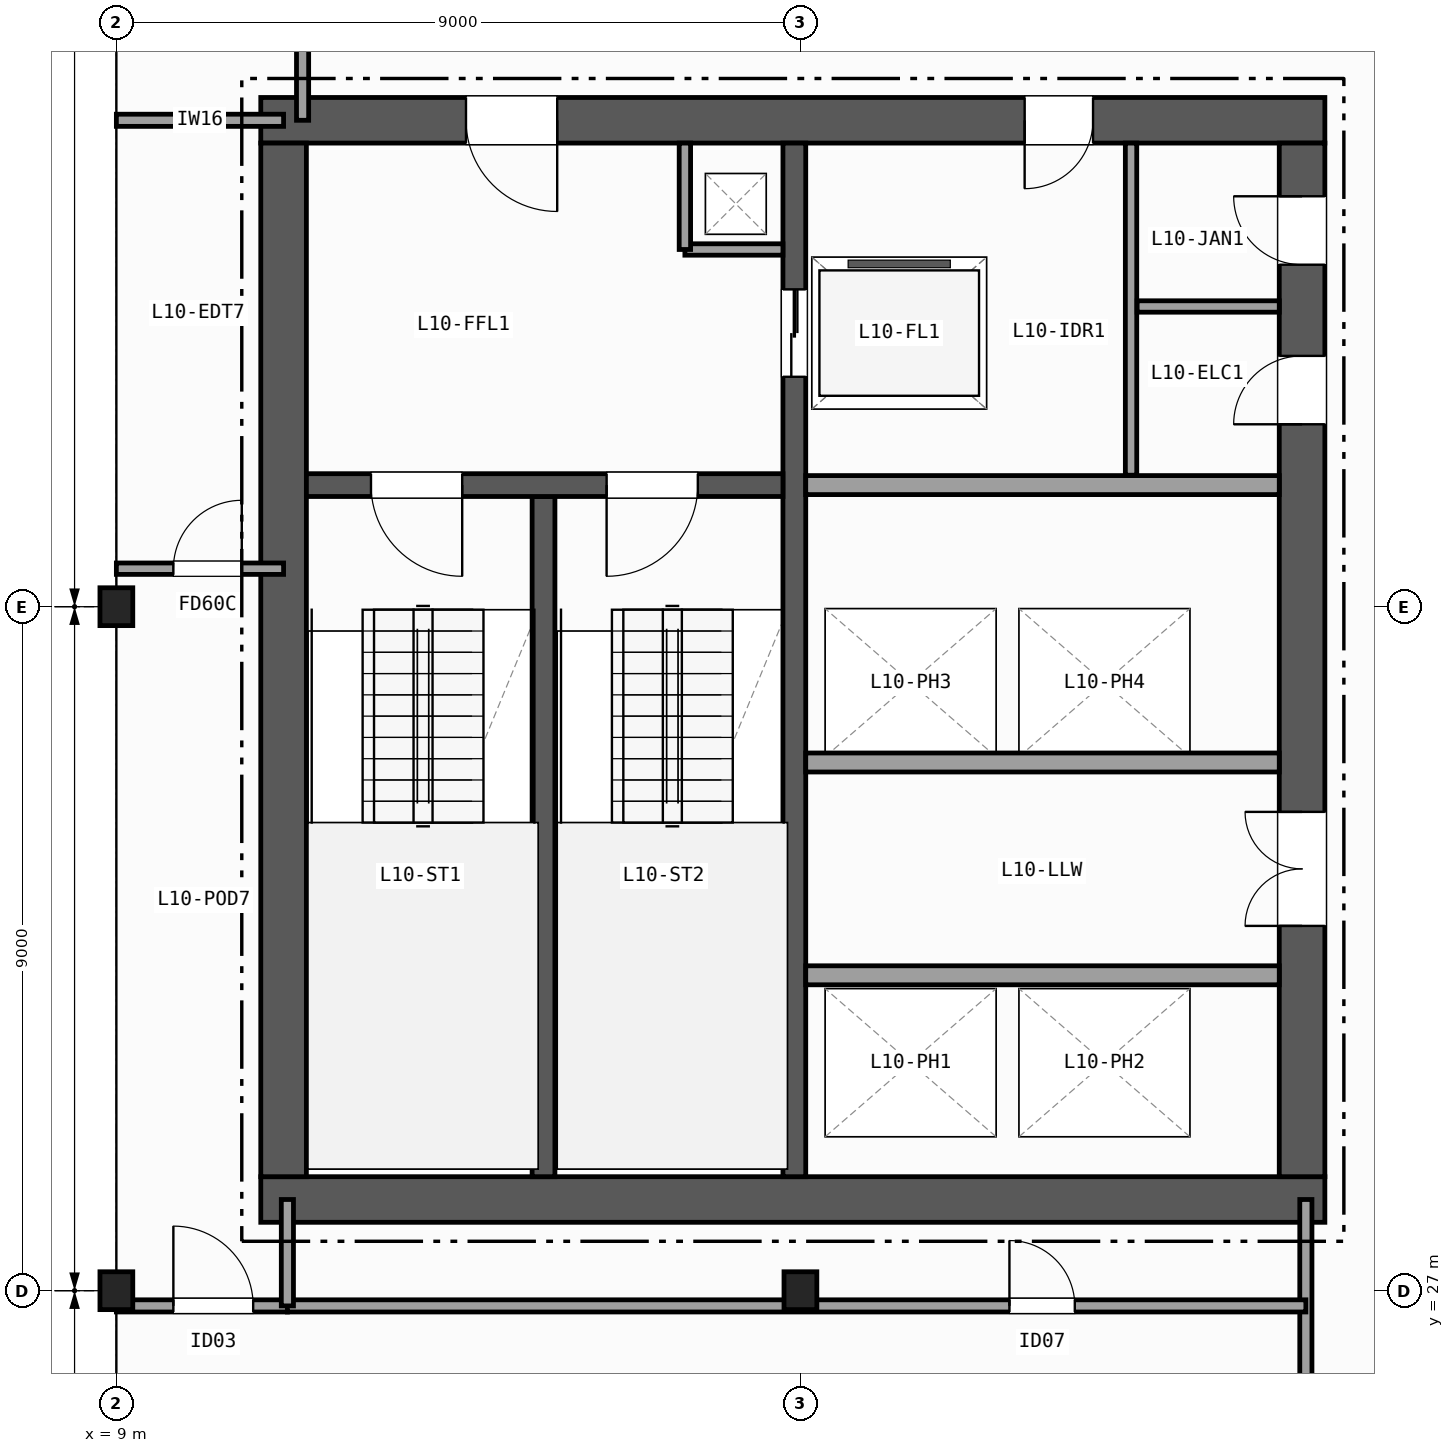
"""IFC4 building model, lengths in metres.
Left out: names, types, materials, properties, quantities, classifications, styles, units other than length and angle.
Written with IfcOpenShell. Run it as: python <this file> out.ifc"""

import sys

from ifc_helpers import new_model, si_unit, direction, frame, frame_2d, origin, origin_2d, place, context, subcontext, project, spatial, rectangle, i_section, extrude, element, fill, save


model = new_model("IFC4")
c1 = context("Model", 3, precision=1e-05, world=origin(), true_north=direction((0.0, 1.0)))
c2 = subcontext(c1, "Body", "Model", "MODEL_VIEW")
j1 = project(units=[si_unit("LENGTHUNIT", "METRE"), si_unit("PLANEANGLEUNIT", "RADIAN")], contexts=[c1])
p1 = place(None, origin())
s1 = spatial("IfcSite", under=j1, at=p1, CompositionType="ELEMENT")
p2 = place(p1, origin())
s2 = spatial("IfcBuilding", under=s1, at=p2, CompositionType="ELEMENT")
p3 = place(p2, frame((0.0, 0.0, 47.1)))
s3 = spatial("IfcBuildingStorey", under=s2, at=p3, CompositionType="ELEMENT", Elevation=47.1)
for number, where, z_axis, x_axis in (
    (1, (9.0, 27.0, 0.0), (0.0, 0.0, 1.0), (1.0, 0.0, 0.0)),
    (2, (9.0, 36.0, 0.0), (0.0, 0.0, 1.0), (1.0, 0.0, 0.0)),
    (3, (18.0, 27.0, 0.0), (0.0, 0.0, 1.0), (1.0, 0.0, 0.0)),
):
    element("IfcColumn", number, at=place(p3, frame(where, z_axis=z_axis, x_axis=x_axis)), inside=s3, PredefinedType="COLUMN", context=c2, shape_type="SweptSolid", body=[
        extrude(i_section(OverallWidth=0.432, OverallDepth=0.498, WebThickness=0.056, FlangeThickness=0.089, FilletRadius=0.015, at=origin_2d()), origin(), (0.0, 0.0, 1.0), 3.7),
    ])
p4 = place(p3, frame((10.9, 28.2, 0.0), z_axis=(0.0, 0.0, 1.0), x_axis=(1.0, 0.0, 0.0)))
e4 = element("IfcWall", 4, at=p4, inside=s3, PredefinedType="SHEAR", context=c2, shape_type="SweptSolid", body=[
    extrude(rectangle(XDim=14.0, YDim=0.6, at=frame_2d((7.0, 0.0))), origin(), (0.0, 0.0, 1.0), 3.42),
])
p5 = place(p3, frame((24.9, 42.4, 0.0), z_axis=(0.0, 0.0, 1.0), x_axis=(-1.0, 0.0, 0.0)))
e5 = element("IfcWall", 5, at=p5, inside=s3, PredefinedType="SHEAR", context=c2, shape_type="SweptSolid", body=[
    extrude(rectangle(XDim=14.0, YDim=0.6, at=frame_2d((7.0, 0.0))), origin(), (0.0, 0.0, 1.0), 3.42),
])
p6 = place(p5, frame((10.1, 0.0, 0.0)))
e6 = element("IfcOpeningElement", 6, at=p6, cuts=e5, PredefinedType="OPENING", context=c2, shape_type="SweptSolid", body=[
    extrude(rectangle(XDim=1.2, YDim=2.15, at=frame_2d((0.6, 1.075))), frame((0.0, 0.31, 0.0), z_axis=(0.0, -1.0, 0.0), x_axis=(1.0, 0.0, 0.0)), (0.0, 0.0, 1.0), 0.62),
])
p7 = place(p5, frame((3.05, 0.0, 0.0)))
e7 = element("IfcOpeningElement", 7, at=p7, cuts=e5, PredefinedType="OPENING", context=c2, shape_type="SweptSolid", body=[
    extrude(rectangle(XDim=0.9, YDim=2.1, at=frame_2d((0.45, 1.05))), frame((0.0, 0.31, 0.0), z_axis=(0.0, -1.0, 0.0), x_axis=(1.0, 0.0, 0.0)), (0.0, 0.0, 1.0), 0.62),
])
p8 = place(p3, frame((11.2, 42.1, 0.0), z_axis=(0.0, 0.0, 1.0), x_axis=(0.0, -1.0, 0.0)))
e8 = element("IfcWall", 8, at=p8, inside=s3, PredefinedType="SHEAR", context=c2, shape_type="SweptSolid", body=[
    extrude(rectangle(XDim=13.6, YDim=0.6, at=frame_2d((6.8, 0.0))), origin(), (0.0, 0.0, 1.0), 3.42),
])
p9 = place(p3, frame((24.6, 28.5, 0.0), z_axis=(0.0, 0.0, 1.0), x_axis=(0.0, 1.0, 0.0)))
e9 = element("IfcWall", 9, at=p9, inside=s3, PredefinedType="SHEAR", context=c2, shape_type="SweptSolid", body=[
    extrude(rectangle(XDim=13.6, YDim=0.6, at=frame_2d((6.8, 0.0))), origin(), (0.0, 0.0, 1.0), 3.42),
])
p10 = place(p9, frame((3.3, 0.0, 0.0)))
e10 = element("IfcOpeningElement", 10, at=p10, cuts=e9, PredefinedType="OPENING", context=c2, shape_type="SweptSolid", body=[
    extrude(rectangle(XDim=1.5, YDim=2.2, at=frame_2d((0.75, 1.1))), frame((0.0, 0.31, 0.0), z_axis=(0.0, -1.0, 0.0), x_axis=(1.0, 0.0, 0.0)), (0.0, 0.0, 1.0), 0.62),
])
p11 = place(p9, frame((9.9, 0.0, 0.0)))
e11 = element("IfcOpeningElement", 11, at=p11, cuts=e9, PredefinedType="OPENING", context=c2, shape_type="SweptSolid", body=[
    extrude(rectangle(XDim=0.9, YDim=2.1, at=frame_2d((0.45, 1.05))), frame((0.0, 0.31, 0.0), z_axis=(0.0, -1.0, 0.0), x_axis=(1.0, 0.0, 0.0)), (0.0, 0.0, 1.0), 0.62),
])
p12 = place(p9, frame((12.0, 0.0, 0.0)))
e12 = element("IfcOpeningElement", 12, at=p12, cuts=e9, PredefinedType="OPENING", context=c2, shape_type="SweptSolid", body=[
    extrude(rectangle(XDim=0.9, YDim=2.1, at=frame_2d((0.45, 1.05))), frame((0.0, 0.31, 0.0), z_axis=(0.0, -1.0, 0.0), x_axis=(1.0, 0.0, 0.0)), (0.0, 0.0, 1.0), 0.62),
])
p13 = place(p3, frame((14.62, 28.5, 0.0), z_axis=(0.0, 0.0, 1.0), x_axis=(0.0, 1.0, 0.0)))
e13 = element("IfcWall", 13, at=p13, inside=s3, PredefinedType="SHEAR", context=c2, shape_type="SweptSolid", body=[
    extrude(rectangle(XDim=8.95, YDim=0.3, at=frame_2d((4.475, 0.0))), origin(), (0.0, 0.0, 1.0), 3.42),
])
p14 = place(p3, frame((17.92, 42.1, 0.0), z_axis=(0.0, 0.0, 1.0), x_axis=(0.0, -1.0, 0.0)))
e14 = element("IfcWall", 14, at=p14, inside=s3, PredefinedType="SHEAR", context=c2, shape_type="SweptSolid", body=[
    extrude(rectangle(XDim=13.6, YDim=0.3, at=frame_2d((6.8, 0.0))), origin(), (0.0, 0.0, 1.0), 3.42),
])
p15 = place(p14, frame((1.925, 0.0, 0.0)))
e15 = element("IfcOpeningElement", 15, at=p15, cuts=e14, PredefinedType="OPENING", context=c2, shape_type="SweptSolid", body=[
    extrude(rectangle(XDim=1.15, YDim=2.15, at=frame_2d((0.575, 1.075))), frame((0.0, 0.16, 0.0), z_axis=(0.0, -1.0, 0.0), x_axis=(1.0, 0.0, 0.0)), (0.0, 0.0, 1.0), 0.32),
])
p16 = place(p3, frame((17.77, 37.6, 0.0), z_axis=(0.0, 0.0, 1.0), x_axis=(-1.0, 0.0, 0.0)))
e16 = element("IfcWall", 16, at=p16, inside=s3, PredefinedType="SHEAR", context=c2, shape_type="SweptSolid", body=[
    extrude(rectangle(XDim=6.27, YDim=0.3, at=frame_2d((3.135, 0.0))), origin(), (0.0, 0.0, 1.0), 3.42),
])
p17 = place(p16, frame((4.22, 0.0, 0.0)))
e17 = element("IfcOpeningElement", 17, at=p17, cuts=e16, PredefinedType="OPENING", context=c2, shape_type="SweptSolid", body=[
    extrude(rectangle(XDim=1.2, YDim=2.15, at=frame_2d((0.6, 1.075))), frame((0.0, 0.16, 0.0), z_axis=(0.0, -1.0, 0.0), x_axis=(1.0, 0.0, 0.0)), (0.0, 0.0, 1.0), 0.32),
])
p18 = place(p16, frame((1.12, 0.0, 0.0)))
e18 = element("IfcOpeningElement", 18, at=p18, cuts=e16, PredefinedType="OPENING", context=c2, shape_type="SweptSolid", body=[
    extrude(rectangle(XDim=1.2, YDim=2.15, at=frame_2d((0.6, 1.075))), frame((0.0, 0.16, 0.0), z_axis=(0.0, -1.0, 0.0), x_axis=(1.0, 0.0, 0.0)), (0.0, 0.0, 1.0), 0.32),
])
p19 = place(p3, frame((16.48, 40.7, 0.0), z_axis=(0.0, 0.0, 1.0), x_axis=(1.0, 0.0, 0.0)))
e19 = element("IfcWall", 19, at=p19, inside=s3, PredefinedType="PARTITIONING", context=c2, shape_type="SweptSolid", body=[
    extrude(rectangle(XDim=1.29, YDim=0.15, at=frame_2d((0.645, 0.0))), origin(), (0.0, 0.0, 1.0), 3.42),
])
p20 = place(p3, frame((16.48, 40.7, 0.0), z_axis=(0.0, 0.0, 1.0), x_axis=(0.0, 1.0, 0.0)))
e20 = element("IfcWall", 20, at=p20, inside=s3, PredefinedType="PARTITIONING", context=c2, shape_type="SweptSolid", body=[
    extrude(rectangle(XDim=1.4, YDim=0.15, at=frame_2d((0.7, 0.0))), origin(), (0.0, 0.0, 1.0), 3.42),
])
for number, where, z_axis, x_axis in (
    (21, (18.07, 37.6, 0.0), (0.0, 0.0, 1.0), (1.0, 0.0, 0.0)),
    (22, (18.07, 31.15, 0.0), (0.0, 0.0, 1.0), (1.0, 0.0, 0.0)),
    (23, (24.3, 33.95, 0.0), (0.0, 0.0, 1.0), (-1.0, 0.0, 0.0)),
):
    element("IfcWall", number, at=place(p3, frame(where, z_axis=z_axis, x_axis=x_axis)), inside=s3, PredefinedType="PARTITIONING", context=c2, shape_type="SweptSolid", body=[
        extrude(rectangle(XDim=6.23, YDim=0.25, at=frame_2d((3.115, 0.0))), origin(), (0.0, 0.0, 1.0), 3.42),
    ])
p21 = place(p3, frame((22.35, 37.73, 0.0), z_axis=(0.0, 0.0, 1.0), x_axis=(0.0, 1.0, 0.0)))
e24 = element("IfcWall", 24, at=p21, inside=s3, PredefinedType="PARTITIONING", context=c2, shape_type="SweptSolid", body=[
    extrude(rectangle(XDim=4.37, YDim=0.15, at=frame_2d((2.185, 0.0))), origin(), (0.0, 0.0, 1.0), 3.42),
])
p22 = place(p3, frame((22.43, 39.95, 0.0), z_axis=(0.0, 0.0, 1.0), x_axis=(1.0, 0.0, 0.0)))
e25 = element("IfcWall", 25, at=p22, inside=s3, PredefinedType="PARTITIONING", context=c2, shape_type="SweptSolid", body=[
    extrude(rectangle(XDim=1.87, YDim=0.15, at=frame_2d((0.935, 0.0))), origin(), (0.0, 0.0, 1.0), 3.42),
])
p23 = place(p3, frame((9.0, 26.8, 0.0), z_axis=(0.0, 0.0, 1.0), x_axis=(1.0, 0.0, 0.0)))
e26 = element("IfcWall", 26, at=p23, inside=s3, PredefinedType="PARTITIONING", context=c2, shape_type="SweptSolid", body=[
    extrude(rectangle(XDim=2.25, YDim=0.16, at=frame_2d((1.125, 0.0))), origin(), (0.0, 0.0, 1.0), 2.627),
])
p24 = place(p23, frame((0.75, 0.0, 0.0)))
e27 = element("IfcOpeningElement", 27, at=p24, cuts=e26, PredefinedType="OPENING", context=c2, shape_type="SweptSolid", body=[
    extrude(rectangle(XDim=1.05, YDim=2.15, at=frame_2d((0.525, 1.075))), frame((0.0, 0.09, 0.0), z_axis=(0.0, -1.0, 0.0), x_axis=(1.0, 0.0, 0.0)), (0.0, 0.0, 1.0), 0.18),
])
p25 = place(p3, frame((9.0, 42.4, 0.0), z_axis=(0.0, 0.0, 1.0), x_axis=(1.0, 0.0, 0.0)))
e28 = element("IfcWall", 28, at=p25, inside=s3, PredefinedType="PARTITIONING", context=c2, shape_type="SweptSolid", body=[
    extrude(rectangle(XDim=2.2, YDim=0.16, at=frame_2d((1.1, 0.0))), origin(), (0.0, 0.0, 1.0), 2.627),
])
p26 = place(p3, frame((11.45, 42.4, 0.0), z_axis=(0.0, 0.0, 1.0), x_axis=(0.0, 1.0, 0.0)))
e29 = element("IfcWall", 29, at=p26, inside=s3, PredefinedType="PARTITIONING", context=c2, shape_type="SweptSolid", body=[
    extrude(rectangle(XDim=2.1, YDim=0.16, at=frame_2d((1.05, 0.0))), origin(), (0.0, 0.0, 1.0), 3.42),
])
p27 = place(p3, frame((9.0, 36.5, 0.0), z_axis=(0.0, 0.0, 1.0), x_axis=(1.0, 0.0, 0.0)))
e30 = element("IfcWall", 30, at=p27, inside=s3, PredefinedType="PARTITIONING", context=c2, shape_type="SweptSolid", body=[
    extrude(rectangle(XDim=2.2, YDim=0.15, at=frame_2d((1.1, 0.0))), origin(), (0.0, 0.0, 1.0), 2.627),
])
p28 = place(p27, frame((0.75, 0.0, 0.0)))
e31 = element("IfcOpeningElement", 31, at=p28, cuts=e30, PredefinedType="OPENING", context=c2, shape_type="SweptSolid", body=[
    extrude(rectangle(XDim=0.9, YDim=2.1, at=frame_2d((0.45, 1.05))), frame((0.0, 0.085, 0.0), z_axis=(0.0, -1.0, 0.0), x_axis=(1.0, 0.0, 0.0)), (0.0, 0.0, 1.0), 0.17),
])
p29 = place(p3, frame((24.65, 9.0, 0.0), z_axis=(0.0, 0.0, 1.0), x_axis=(0.0, 1.0, 0.0)))
e32 = element("IfcWall", 32, at=p29, inside=s3, PredefinedType="PARTITIONING", context=c2, shape_type="SweptSolid", body=[
    extrude(rectangle(XDim=19.2, YDim=0.16, at=frame_2d((9.6, 0.0))), origin(), (0.0, 0.0, 1.0), 2.627),
])
p30 = place(p29, frame((12.2, 0.0, 0.0)))
e33 = element("IfcOpeningElement", 33, at=p30, cuts=e32, PredefinedType="OPENING", context=c2, shape_type="SweptSolid", body=[
    extrude(rectangle(XDim=0.95, YDim=2.1, at=frame_2d((0.475, 1.05))), frame((0.0, 0.09, 0.0), z_axis=(0.0, -1.0, 0.0), x_axis=(1.0, 0.0, 0.0)), (0.0, 0.0, 1.0), 0.18),
])
p31 = place(p29, frame((4.2, 0.0, 0.0)))
e34 = element("IfcOpeningElement", 34, at=p31, cuts=e32, PredefinedType="OPENING", context=c2, shape_type="SweptSolid", body=[
    extrude(rectangle(XDim=1.0, YDim=2.1, at=frame_2d((0.5, 1.05))), frame((0.0, 0.09, 0.0), z_axis=(0.0, -1.0, 0.0), x_axis=(1.0, 0.0, 0.0)), (0.0, 0.0, 1.0), 0.18),
])
p32 = place(p3, frame((11.25, 26.8, 0.0), z_axis=(0.0, 0.0, 1.0), x_axis=(1.0, 0.0, 0.0)))
e35 = element("IfcWall", 35, at=p32, inside=s3, PredefinedType="PARTITIONING", context=c2, shape_type="SweptSolid", body=[
    extrude(rectangle(XDim=13.4, YDim=0.16, at=frame_2d((6.7, 0.0))), origin(), (0.0, 0.0, 1.0), 2.789),
])
p33 = place(p32, frame((9.5, 0.0, 0.0)))
e36 = element("IfcOpeningElement", 36, at=p33, cuts=e35, PredefinedType="OPENING", context=c2, shape_type="SweptSolid", body=[
    extrude(rectangle(XDim=0.86, YDim=2.05, at=frame_2d((0.43, 1.025))), frame((0.0, 0.09, 0.0), z_axis=(0.0, -1.0, 0.0), x_axis=(1.0, 0.0, 0.0)), (0.0, 0.0, 1.0), 0.18),
])
p34 = place(p3, frame((11.25, 26.8, 0.0), z_axis=(0.0, 0.0, 1.0), x_axis=(0.0, 1.0, 0.0)))
e37 = element("IfcWall", 37, at=p34, inside=s3, PredefinedType="PARTITIONING", context=c2, shape_type="SweptSolid", body=[
    extrude(rectangle(XDim=1.4, YDim=0.16, at=frame_2d((0.7, 0.0))), origin(), (0.0, 0.0, 1.0), 2.789),
])
p35 = place(p17, origin())
e38 = element("IfcDoor", 38, at=p35, inside=s3, OperationType="SINGLE_SWING_LEFT", PredefinedType="DOOR", context=c2, shape_type="SweptSolid", body=[
    extrude(rectangle(XDim=1.2, YDim=2.15, at=frame_2d((0.6, 1.075))), frame((0.0, 0.025, 0.0), z_axis=(0.0, -1.0, 0.0), x_axis=(1.0, 0.0, 0.0)), (0.0, 0.0, 1.0), 0.05),
])
fill(e17, e38)
p36 = place(p18, origin())
e39 = element("IfcDoor", 39, at=p36, inside=s3, OperationType="SINGLE_SWING_RIGHT", PredefinedType="DOOR", context=c2, shape_type="SweptSolid", body=[
    extrude(rectangle(XDim=1.2, YDim=2.15, at=frame_2d((0.6, 1.075))), frame((0.0, 0.025, 0.0), z_axis=(0.0, -1.0, 0.0), x_axis=(1.0, 0.0, 0.0)), (0.0, 0.0, 1.0), 0.05),
])
fill(e18, e39)
p37 = place(p10, origin())
e40 = element("IfcDoor", 40, at=p37, inside=s3, OperationType="DOUBLE_DOOR_SINGLE_SWING", PredefinedType="DOOR", context=c2, shape_type="SweptSolid", body=[
    extrude(rectangle(XDim=1.5, YDim=2.2, at=frame_2d((0.75, 1.1))), frame((0.0, 0.025, 0.0), z_axis=(0.0, -1.0, 0.0), x_axis=(1.0, 0.0, 0.0)), (0.0, 0.0, 1.0), 0.05),
])
fill(e10, e40)
p38 = place(p6, origin())
e41 = element("IfcDoor", 41, at=p38, inside=s3, OperationType="SINGLE_SWING_LEFT", PredefinedType="DOOR", context=c2, shape_type="SweptSolid", body=[
    extrude(rectangle(XDim=1.2, YDim=2.15, at=frame_2d((0.6, 1.075))), frame((0.0, 0.025, 0.0), z_axis=(0.0, -1.0, 0.0), x_axis=(1.0, 0.0, 0.0)), (0.0, 0.0, 1.0), 0.05),
])
fill(e6, e41)
p39 = place(p11, origin())
e42 = element("IfcDoor", 42, at=p39, inside=s3, OperationType="SINGLE_SWING_LEFT", PredefinedType="DOOR", context=c2, shape_type="SweptSolid", body=[
    extrude(rectangle(XDim=0.9, YDim=2.1, at=frame_2d((0.45, 1.05))), frame((0.0, 0.025, 0.0), z_axis=(0.0, -1.0, 0.0), x_axis=(1.0, 0.0, 0.0)), (0.0, 0.0, 1.0), 0.05),
])
fill(e11, e42)
p40 = place(p7, origin())
e43 = element("IfcDoor", 43, at=p40, inside=s3, OperationType="SINGLE_SWING_RIGHT", PredefinedType="DOOR", context=c2, shape_type="SweptSolid", body=[
    extrude(rectangle(XDim=0.9, YDim=2.1, at=frame_2d((0.45, 1.05))), frame((0.0, 0.025, 0.0), z_axis=(0.0, -1.0, 0.0), x_axis=(1.0, 0.0, 0.0)), (0.0, 0.0, 1.0), 0.05),
])
fill(e7, e43)
p41 = place(p12, origin())
e44 = element("IfcDoor", 44, at=p41, inside=s3, OperationType="SINGLE_SWING_RIGHT", PredefinedType="DOOR", context=c2, shape_type="SweptSolid", body=[
    extrude(rectangle(XDim=0.9, YDim=2.1, at=frame_2d((0.45, 1.05))), frame((0.0, 0.025, 0.0), z_axis=(0.0, -1.0, 0.0), x_axis=(1.0, 0.0, 0.0)), (0.0, 0.0, 1.0), 0.05),
])
fill(e12, e44)
p42 = place(p15, origin())
e45 = element("IfcDoor", 45, at=p42, inside=s3, OperationType="DOUBLE_DOOR_SLIDING", PredefinedType="DOOR", context=c2, shape_type="SweptSolid", body=[
    extrude(rectangle(XDim=1.15, YDim=2.15, at=frame_2d((0.575, 1.075))), frame((0.0, 0.025, 0.0), z_axis=(0.0, -1.0, 0.0), x_axis=(1.0, 0.0, 0.0)), (0.0, 0.0, 1.0), 0.05),
])
fill(e15, e45)
p43 = place(p24, origin())
e46 = element("IfcDoor", 46, at=p43, inside=s3, OperationType="SINGLE_SWING_LEFT", PredefinedType="DOOR", context=c2, shape_type="SweptSolid", body=[
    extrude(rectangle(XDim=1.05, YDim=2.15, at=frame_2d((0.525, 1.075))), frame((0.0, 0.025, 0.0), z_axis=(0.0, -1.0, 0.0), x_axis=(1.0, 0.0, 0.0)), (0.0, 0.0, 1.0), 0.05),
])
fill(e27, e46)
p44 = place(p28, origin())
e47 = element("IfcDoor", 47, at=p44, inside=s3, OperationType="SINGLE_SWING_RIGHT", PredefinedType="DOOR", context=c2, shape_type="SweptSolid", body=[
    extrude(rectangle(XDim=0.9, YDim=2.1, at=frame_2d((0.45, 1.05))), frame((0.0, 0.025, 0.0), z_axis=(0.0, -1.0, 0.0), x_axis=(1.0, 0.0, 0.0)), (0.0, 0.0, 1.0), 0.05),
])
fill(e31, e47)
p45 = place(p33, origin())
e48 = element("IfcDoor", 48, at=p45, inside=s3, OperationType="SINGLE_SWING_LEFT", PredefinedType="DOOR", context=c2, shape_type="SweptSolid", body=[
    extrude(rectangle(XDim=0.86, YDim=2.05, at=frame_2d((0.43, 1.025))), frame((0.0, 0.025, 0.0), z_axis=(0.0, -1.0, 0.0), x_axis=(1.0, 0.0, 0.0)), (0.0, 0.0, 1.0), 0.05),
])
fill(e36, e48)
save(model, sys.argv[1])
